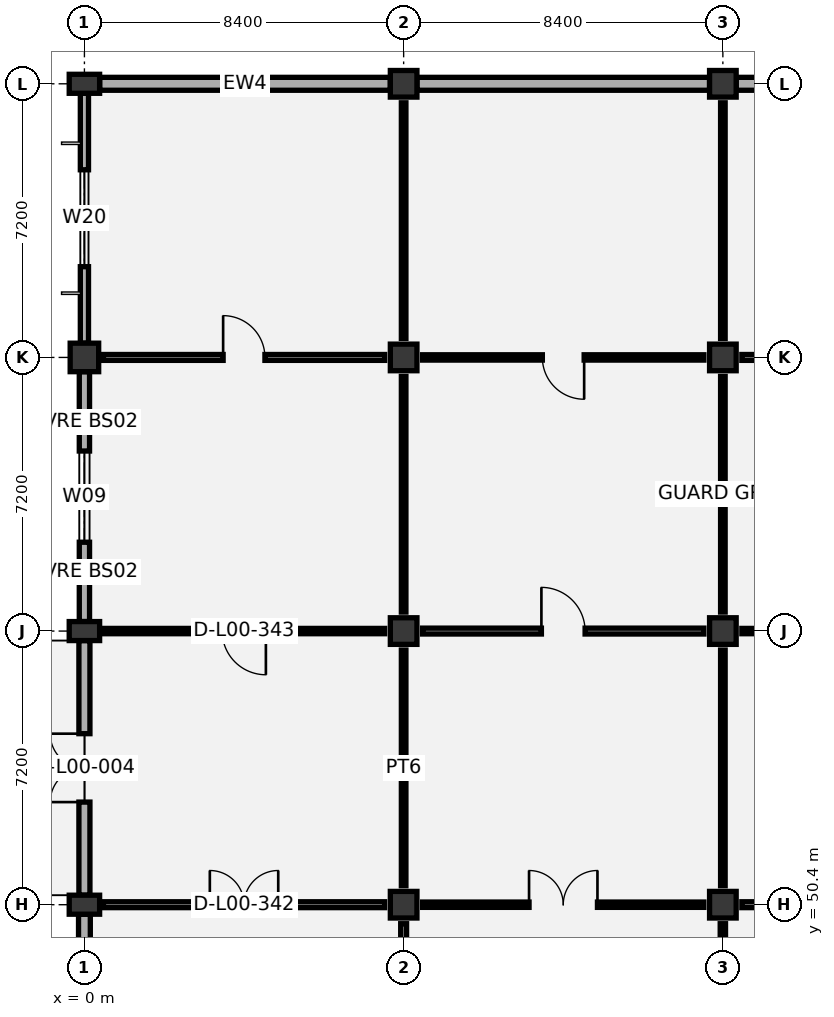
"""IFC4 building model, lengths in metres.
Left out: names, types, materials, properties, quantities, classifications, styles, units other than length and angle.
Written with IfcOpenShell. Run it as: python <this file> out.ifc"""

import sys

from ifc_helpers import new_model, si_unit, direction, frame, frame_2d, origin, origin_2d, place, context, subcontext, project, spatial, rectangle, circle, extrude, element, fill, save


model = new_model("IFC4")
c1 = context("Model", 3, precision=1e-05, world=origin(), true_north=direction((0.0, 1.0)))
c2 = subcontext(c1, "Body", "Model", "MODEL_VIEW")
j1 = project(units=[si_unit("LENGTHUNIT", "METRE"), si_unit("PLANEANGLEUNIT", "RADIAN")], contexts=[c1])
p1 = place(None, origin())
s1 = spatial("IfcSite", under=j1, at=p1, CompositionType="ELEMENT")
p2 = place(p1, origin())
s2 = spatial("IfcBuilding", under=s1, at=p2, CompositionType="ELEMENT")
p3 = place(p2, origin())
s3 = spatial("IfcBuildingStorey", under=s2, at=p3, CompositionType="ELEMENT", Elevation=0.0)
for number, where, z_axis, x_axis in (
    (1, (0.0, 50.4, 0.0), (0.0, 0.0, 1.0), (0.0, 1.0, 0.0)),
    (2, (0.0, 57.6, 0.0), (0.0, 0.0, 1.0), (0.0, 1.0, 0.0)),
):
    element("IfcColumn", number, at=place(p3, frame(where, z_axis=z_axis, x_axis=x_axis)), inside=s3, PredefinedType="COLUMN", context=c2, shape_type="SweptSolid", body=[
        extrude(rectangle(XDim=0.5, YDim=0.8, at=origin_2d()), origin(), (0.0, 0.0, 1.0), 6.0),
    ])
p4 = place(p3, frame((0.0, 64.8, 0.0), z_axis=(0.0, 0.0, 1.0), x_axis=(1.0, 0.0, 0.0)))
e3 = element("IfcColumn", 3, at=p4, inside=s3, PredefinedType="COLUMN", context=c2, shape_type="SweptSolid", body=[
    extrude(circle(Radius=0.375, at=origin_2d()), origin(), (0.0, 0.0, 1.0), 6.0),
])
p5 = place(p3, frame((0.0, 72.0, 0.0), z_axis=(0.0, 0.0, 1.0), x_axis=(0.0, 1.0, 0.0)))
e4 = element("IfcColumn", 4, at=p5, inside=s3, PredefinedType="COLUMN", context=c2, shape_type="SweptSolid", body=[
    extrude(rectangle(XDim=0.5, YDim=0.8, at=origin_2d()), origin(), (0.0, 0.0, 1.0), 6.0),
])
for number, where, z_axis, x_axis in (
    (5, (8.4, 50.4, 0.0), (0.0, 0.0, 1.0), (1.0, 0.0, 0.0)),
    (6, (8.4, 57.6, 0.0), (0.0, 0.0, 1.0), (1.0, 0.0, 0.0)),
    (7, (8.4, 64.8, 0.0), (0.0, 0.0, 1.0), (1.0, 0.0, 0.0)),
    (8, (8.4, 72.0, 0.0), (0.0, 0.0, 1.0), (1.0, 0.0, 0.0)),
    (9, (16.8, 50.4, 0.0), (0.0, 0.0, 1.0), (1.0, 0.0, 0.0)),
    (10, (16.8, 57.6, 0.0), (0.0, 0.0, 1.0), (1.0, 0.0, 0.0)),
    (11, (16.8, 64.8, 0.0), (0.0, 0.0, 1.0), (1.0, 0.0, 0.0)),
    (12, (16.8, 72.0, 0.0), (0.0, 0.0, 1.0), (1.0, 0.0, 0.0)),
):
    element("IfcColumn", number, at=place(p3, frame(where, z_axis=z_axis, x_axis=x_axis)), inside=s3, PredefinedType="COLUMN", context=c2, shape_type="SweptSolid", body=[
        extrude(rectangle(XDim=0.7, YDim=0.7, at=origin_2d()), origin(), (0.0, 0.0, 1.0), 6.0),
    ])
p6 = place(p3, frame((0.0, 43.45, 0.0), z_axis=(0.0, 0.0, 1.0), x_axis=(0.0, 1.0, 0.0)))
e13 = element("IfcWall", 13, at=p6, inside=s3, PredefinedType="SOLIDWALL", context=c2, shape_type="SweptSolid", body=[
    extrude(rectangle(XDim=6.7, YDim=0.31, at=frame_2d((3.35, 0.0))), origin(), (0.0, 0.0, 1.0), 5.02),
])
p7 = place(p6, frame((1.85, 0.0, 0.9)))
e14 = element("IfcOpeningElement", 14, at=p7, cuts=e13, PredefinedType="OPENING", context=c2, shape_type="SweptSolid", body=[
    extrude(rectangle(XDim=3.0, YDim=2.1, at=frame_2d((1.5, 1.05))), frame((0.0, 0.165, 0.0), z_axis=(0.0, -1.0, 0.0), x_axis=(1.0, 0.0, 0.0)), (0.0, 0.0, 1.0), 0.33),
])
p8 = place(p3, frame((0.0, 50.65, 0.0), z_axis=(0.0, 0.0, 1.0), x_axis=(0.0, 1.0, 0.0)))
e15 = element("IfcWall", 15, at=p8, inside=s3, PredefinedType="SOLIDWALL", context=c2, shape_type="SweptSolid", body=[
    extrude(rectangle(XDim=6.7, YDim=0.29, at=frame_2d((3.35, 0.0))), origin(), (0.0, 0.0, 1.0), 5.02),
])
p9 = place(p8, frame((2.45, 0.0, 0.0)))
e16 = element("IfcOpeningElement", 16, at=p9, cuts=e15, PredefinedType="OPENING", context=c2, shape_type="SweptSolid", body=[
    extrude(rectangle(XDim=1.8, YDim=2.35, at=frame_2d((0.9, 1.175))), frame((0.0, 0.155, 0.0), z_axis=(0.0, -1.0, 0.0), x_axis=(1.0, 0.0, 0.0)), (0.0, 0.0, 1.0), 0.31),
])
p10 = place(p3, frame((0.0, 57.85, 0.0), z_axis=(0.0, 0.0, 1.0), x_axis=(0.0, 1.0, 0.0)))
e17 = element("IfcWall", 17, at=p10, inside=s3, PredefinedType="SOLIDWALL", context=c2, shape_type="SweptSolid", body=[
    extrude(rectangle(XDim=6.575, YDim=0.27, at=frame_2d((3.288, 0.0))), origin(), (0.0, 0.0, 1.0), 5.02),
])
p11 = place(p10, frame((2.087, 0.0, 0.9)))
e18 = element("IfcOpeningElement", 18, at=p11, cuts=e17, PredefinedType="OPENING", context=c2, shape_type="SweptSolid", body=[
    extrude(rectangle(XDim=2.4, YDim=2.1, at=frame_2d((1.2, 1.05))), frame((0.0, 0.145, 0.0), z_axis=(0.0, -1.0, 0.0), x_axis=(1.0, 0.0, 0.0)), (0.0, 0.0, 1.0), 0.29),
])
p12 = place(p3, frame((0.4, 72.0, 0.0), z_axis=(0.0, 0.0, 1.0), x_axis=(1.0, 0.0, 0.0)))
e19 = element("IfcWall", 19, at=p12, inside=s3, PredefinedType="SOLIDWALL", context=c2, shape_type="SweptSolid", body=[
    extrude(rectangle(XDim=7.65, YDim=0.34, at=frame_2d((3.825, 0.0))), origin(), (0.0, 0.0, 1.0), 5.02),
])
p13 = place(p3, frame((0.0, 65.175, 0.0), z_axis=(0.0, 0.0, 1.0), x_axis=(0.0, 1.0, 0.0)))
e20 = element("IfcWall", 20, at=p13, inside=s3, PredefinedType="SOLIDWALL", context=c2, shape_type="SweptSolid", body=[
    extrude(rectangle(XDim=6.575, YDim=0.215, at=frame_2d((3.288, 0.0))), origin(), (0.0, 0.0, 1.0), 5.02),
])
p14 = place(p13, frame((2.012, 0.0, 0.9)))
e21 = element("IfcOpeningElement", 21, at=p14, cuts=e20, PredefinedType="OPENING", context=c2, shape_type="SweptSolid", body=[
    extrude(rectangle(XDim=2.55, YDim=1.95, at=frame_2d((1.275, 0.975))), frame((0.0, 0.117, 0.0), z_axis=(0.0, -1.0, 0.0), x_axis=(1.0, 0.0, 0.0)), (0.0, 0.0, 1.0), 0.235),
])
p15 = place(p3, frame((8.75, 72.0, 0.0), z_axis=(0.0, 0.0, 1.0), x_axis=(1.0, 0.0, 0.0)))
e22 = element("IfcWall", 22, at=p15, inside=s3, PredefinedType="SOLIDWALL", context=c2, shape_type="SweptSolid", body=[
    extrude(rectangle(XDim=7.7, YDim=0.34, at=frame_2d((3.85, 0.0))), origin(), (0.0, 0.0, 1.0), 5.02),
])
p16 = place(p3, frame((17.15, 72.0, 0.0), z_axis=(0.0, 0.0, 1.0), x_axis=(1.0, 0.0, 0.0)))
e23 = element("IfcWall", 23, at=p16, inside=s3, PredefinedType="SOLIDWALL", context=c2, shape_type="SweptSolid", body=[
    extrude(rectangle(XDim=7.7, YDim=0.34, at=frame_2d((3.85, 0.0))), origin(), (0.0, 0.0, 1.0), 5.02),
])
p17 = place(p3, frame((8.4, 43.7, 0.0), z_axis=(0.0, 0.0, 1.0), x_axis=(0.0, 1.0, 0.0)))
e24 = element("IfcWall", 24, at=p17, inside=s3, PredefinedType="PARTITIONING", context=c2, shape_type="SweptSolid", body=[
    extrude(rectangle(XDim=6.2, YDim=0.155, at=frame_2d((3.1, 0.0))), origin(), (0.0, 0.0, 1.0), 4.92),
])
p18 = place(p17, frame((2.3, 0.0, 0.0)))
e25 = element("IfcOpeningElement", 25, at=p18, cuts=e24, PredefinedType="OPENING", context=c2, shape_type="SweptSolid", body=[
    extrude(rectangle(XDim=1.6, YDim=2.2, at=frame_2d((0.8, 1.1))), frame((0.0, 0.087, 0.0), z_axis=(0.0, -1.0, 0.0), x_axis=(1.0, 0.0, 0.0)), (0.0, 0.0, 1.0), 0.175),
])
p19 = place(p3, frame((0.5, 50.4, 0.0), z_axis=(0.0, 0.0, 1.0), x_axis=(1.0, 0.0, 0.0)))
e26 = element("IfcWall", 26, at=p19, inside=s3, PredefinedType="PARTITIONING", context=c2, shape_type="SweptSolid", body=[
    extrude(rectangle(XDim=7.4, YDim=0.155, at=frame_2d((3.7, 0.0))), origin(), (0.0, 0.0, 1.0), 4.87),
])
p20 = place(p19, frame((2.8, 0.0, 0.0)))
e27 = element("IfcOpeningElement", 27, at=p20, cuts=e26, PredefinedType="OPENING", context=c2, shape_type="SweptSolid", body=[
    extrude(rectangle(XDim=1.8, YDim=2.25, at=frame_2d((0.9, 1.125))), frame((0.0, 0.087, 0.0), z_axis=(0.0, -1.0, 0.0), x_axis=(1.0, 0.0, 0.0)), (0.0, 0.0, 1.0), 0.175),
])
p21 = place(p3, frame((8.4, 50.9, 0.0), z_axis=(0.0, 0.0, 1.0), x_axis=(0.0, 1.0, 0.0)))
e28 = element("IfcWall", 28, at=p21, inside=s3, PredefinedType="PARTITIONING", context=c2, shape_type="SweptSolid", body=[
    extrude(rectangle(XDim=6.2, YDim=0.12, at=frame_2d((3.1, 0.0))), origin(), (0.0, 0.0, 1.0), 5.38),
])
p22 = place(p3, frame((0.5, 57.6, 0.0), z_axis=(0.0, 0.0, 1.0), x_axis=(1.0, 0.0, 0.0)))
e29 = element("IfcWall", 29, at=p22, inside=s3, PredefinedType="PARTITIONING", context=c2, shape_type="SweptSolid", body=[
    extrude(rectangle(XDim=7.4, YDim=0.14, at=frame_2d((3.7, 0.0))), origin(), (0.0, 0.0, 1.0), 4.87),
])
p23 = place(p22, frame((3.125, 0.0, 0.0)))
e30 = element("IfcOpeningElement", 30, at=p23, cuts=e29, PredefinedType="OPENING", context=c2, shape_type="SweptSolid", body=[
    extrude(rectangle(XDim=1.15, YDim=2.1, at=frame_2d((0.575, 1.05))), frame((0.0, 0.08, 0.0), z_axis=(0.0, -1.0, 0.0), x_axis=(1.0, 0.0, 0.0)), (0.0, 0.0, 1.0), 0.16),
])
p24 = place(p3, frame((8.4, 58.1, 0.0), z_axis=(0.0, 0.0, 1.0), x_axis=(0.0, 1.0, 0.0)))
e31 = element("IfcWall", 31, at=p24, inside=s3, PredefinedType="PARTITIONING", context=c2, shape_type="SweptSolid", body=[
    extrude(rectangle(XDim=6.2, YDim=0.12, at=frame_2d((3.1, 0.0))), origin(), (0.0, 0.0, 1.0), 4.92),
])
p25 = place(p3, frame((0.5, 64.8, 0.0), z_axis=(0.0, 0.0, 1.0), x_axis=(1.0, 0.0, 0.0)))
e32 = element("IfcWall", 32, at=p25, inside=s3, PredefinedType="PARTITIONING", context=c2, shape_type="SweptSolid", body=[
    extrude(rectangle(XDim=7.4, YDim=0.155, at=frame_2d((3.7, 0.0))), origin(), (0.0, 0.0, 1.0), 4.87),
])
p26 = place(p25, frame((3.15, 0.0, 0.0)))
e33 = element("IfcOpeningElement", 33, at=p26, cuts=e32, PredefinedType="OPENING", context=c2, shape_type="SweptSolid", body=[
    extrude(rectangle(XDim=1.1, YDim=2.1, at=frame_2d((0.55, 1.05))), frame((0.0, 0.087, 0.0), z_axis=(0.0, -1.0, 0.0), x_axis=(1.0, 0.0, 0.0)), (0.0, 0.0, 1.0), 0.175),
])
p27 = place(p3, frame((8.4, 65.3, 0.0), z_axis=(0.0, 0.0, 1.0), x_axis=(0.0, 1.0, 0.0)))
e34 = element("IfcWall", 34, at=p27, inside=s3, PredefinedType="PARTITIONING", context=c2, shape_type="SweptSolid", body=[
    extrude(rectangle(XDim=6.2, YDim=0.12, at=frame_2d((3.1, 0.0))), origin(), (0.0, 0.0, 1.0), 5.17),
])
p28 = place(p3, frame((16.8, 43.7, 0.0), z_axis=(0.0, 0.0, 1.0), x_axis=(0.0, 1.0, 0.0)))
e35 = element("IfcWall", 35, at=p28, inside=s3, PredefinedType="PARTITIONING", context=c2, shape_type="SweptSolid", body=[
    extrude(rectangle(XDim=6.2, YDim=0.14, at=frame_2d((3.1, 0.0))), origin(), (0.0, 0.0, 1.0), 5.38),
])
p29 = place(p28, frame((2.3, 0.0, 0.0)))
e36 = element("IfcOpeningElement", 36, at=p29, cuts=e35, PredefinedType="OPENING", context=c2, shape_type="SweptSolid", body=[
    extrude(rectangle(XDim=1.6, YDim=2.2, at=frame_2d((0.8, 1.1))), frame((0.0, 0.08, 0.0), z_axis=(0.0, -1.0, 0.0), x_axis=(1.0, 0.0, 0.0)), (0.0, 0.0, 1.0), 0.16),
])
p30 = place(p3, frame((8.9, 50.4, 0.0), z_axis=(0.0, 0.0, 1.0), x_axis=(1.0, 0.0, 0.0)))
e37 = element("IfcWall", 37, at=p30, inside=s3, PredefinedType="PARTITIONING", context=c2, shape_type="SweptSolid", body=[
    extrude(rectangle(XDim=7.4, YDim=0.14, at=frame_2d((3.7, 0.0))), origin(), (0.0, 0.0, 1.0), 4.87),
])
p31 = place(p30, frame((2.8, 0.0, 0.0)))
e38 = element("IfcOpeningElement", 38, at=p31, cuts=e37, PredefinedType="OPENING", context=c2, shape_type="SweptSolid", body=[
    extrude(rectangle(XDim=1.8, YDim=2.25, at=frame_2d((0.9, 1.125))), frame((0.0, 0.08, 0.0), z_axis=(0.0, -1.0, 0.0), x_axis=(1.0, 0.0, 0.0)), (0.0, 0.0, 1.0), 0.16),
])
p32 = place(p3, frame((16.8, 50.9, 0.0), z_axis=(0.0, 0.0, 1.0), x_axis=(0.0, 1.0, 0.0)))
e39 = element("IfcWall", 39, at=p32, inside=s3, PredefinedType="PARTITIONING", context=c2, shape_type="SweptSolid", body=[
    extrude(rectangle(XDim=6.2, YDim=0.12, at=frame_2d((3.1, 0.0))), origin(), (0.0, 0.0, 1.0), 4.92),
])
p33 = place(p3, frame((8.9, 57.6, 0.0), z_axis=(0.0, 0.0, 1.0), x_axis=(1.0, 0.0, 0.0)))
e40 = element("IfcWall", 40, at=p33, inside=s3, PredefinedType="PARTITIONING", context=c2, shape_type="SweptSolid", body=[
    extrude(rectangle(XDim=7.4, YDim=0.155, at=frame_2d((3.7, 0.0))), origin(), (0.0, 0.0, 1.0), 4.87),
])
p34 = place(p33, frame((3.125, 0.0, 0.0)))
e41 = element("IfcOpeningElement", 41, at=p34, cuts=e40, PredefinedType="OPENING", context=c2, shape_type="SweptSolid", body=[
    extrude(rectangle(XDim=1.15, YDim=2.1, at=frame_2d((0.575, 1.05))), frame((0.0, 0.087, 0.0), z_axis=(0.0, -1.0, 0.0), x_axis=(1.0, 0.0, 0.0)), (0.0, 0.0, 1.0), 0.175),
])
p35 = place(p3, frame((16.8, 58.1, 0.0), z_axis=(0.0, 0.0, 1.0), x_axis=(0.0, 1.0, 0.0)))
e42 = element("IfcWall", 42, at=p35, inside=s3, PredefinedType="PARTITIONING", context=c2, shape_type="SweptSolid", body=[
    extrude(rectangle(XDim=6.2, YDim=0.12, at=frame_2d((3.1, 0.0))), origin(), (0.0, 0.0, 1.0), 5.17),
])
p36 = place(p3, frame((8.9, 64.8, 0.0), z_axis=(0.0, 0.0, 1.0), x_axis=(1.0, 0.0, 0.0)))
e43 = element("IfcWall", 43, at=p36, inside=s3, PredefinedType="PARTITIONING", context=c2, shape_type="SweptSolid", body=[
    extrude(rectangle(XDim=7.4, YDim=0.14, at=frame_2d((3.7, 0.0))), origin(), (0.0, 0.0, 1.0), 4.87),
])
p37 = place(p36, frame((3.15, 0.0, 0.0)))
e44 = element("IfcOpeningElement", 44, at=p37, cuts=e43, PredefinedType="OPENING", context=c2, shape_type="SweptSolid", body=[
    extrude(rectangle(XDim=1.1, YDim=2.1, at=frame_2d((0.55, 1.05))), frame((0.0, 0.08, 0.0), z_axis=(0.0, -1.0, 0.0), x_axis=(1.0, 0.0, 0.0)), (0.0, 0.0, 1.0), 0.16),
])
p38 = place(p3, frame((16.8, 65.3, 0.0), z_axis=(0.0, 0.0, 1.0), x_axis=(0.0, 1.0, 0.0)))
e45 = element("IfcWall", 45, at=p38, inside=s3, PredefinedType="PARTITIONING", context=c2, shape_type="SweptSolid", body=[
    extrude(rectangle(XDim=6.2, YDim=0.12, at=frame_2d((3.1, 0.0))), origin(), (0.0, 0.0, 1.0), 4.92),
])
p39 = place(p3, frame((17.3, 50.4, 0.0), z_axis=(0.0, 0.0, 1.0), x_axis=(1.0, 0.0, 0.0)))
e46 = element("IfcWall", 46, at=p39, inside=s3, PredefinedType="PARTITIONING", context=c2, shape_type="SweptSolid", body=[
    extrude(rectangle(XDim=7.4, YDim=0.155, at=frame_2d((3.7, 0.0))), origin(), (0.0, 0.0, 1.0), 4.87),
])
p40 = place(p39, frame((2.9, 0.0, 0.0)))
e47 = element("IfcOpeningElement", 47, at=p40, cuts=e46, PredefinedType="OPENING", context=c2, shape_type="SweptSolid", body=[
    extrude(rectangle(XDim=1.6, YDim=2.2, at=frame_2d((0.8, 1.1))), frame((0.0, 0.087, 0.0), z_axis=(0.0, -1.0, 0.0), x_axis=(1.0, 0.0, 0.0)), (0.0, 0.0, 1.0), 0.175),
])
p41 = place(p3, frame((17.3, 57.6, 0.0), z_axis=(0.0, 0.0, 1.0), x_axis=(1.0, 0.0, 0.0)))
e48 = element("IfcWall", 48, at=p41, inside=s3, PredefinedType="PARTITIONING", context=c2, shape_type="SweptSolid", body=[
    extrude(rectangle(XDim=7.4, YDim=0.14, at=frame_2d((3.7, 0.0))), origin(), (0.0, 0.0, 1.0), 4.87),
])
p42 = place(p41, frame((3.15, 0.0, 0.0)))
e49 = element("IfcOpeningElement", 49, at=p42, cuts=e48, PredefinedType="OPENING", context=c2, shape_type="SweptSolid", body=[
    extrude(rectangle(XDim=1.1, YDim=2.1, at=frame_2d((0.55, 1.05))), frame((0.0, 0.08, 0.0), z_axis=(0.0, -1.0, 0.0), x_axis=(1.0, 0.0, 0.0)), (0.0, 0.0, 1.0), 0.16),
])
p43 = place(p3, frame((17.3, 64.8, 0.0), z_axis=(0.0, 0.0, 1.0), x_axis=(1.0, 0.0, 0.0)))
e50 = element("IfcWall", 50, at=p43, inside=s3, PredefinedType="PARTITIONING", context=c2, shape_type="SweptSolid", body=[
    extrude(rectangle(XDim=7.4, YDim=0.155, at=frame_2d((3.7, 0.0))), origin(), (0.0, 0.0, 1.0), 4.87),
])
p44 = place(p43, frame((3.125, 0.0, 0.0)))
e51 = element("IfcOpeningElement", 51, at=p44, cuts=e50, PredefinedType="OPENING", context=c2, shape_type="SweptSolid", body=[
    extrude(rectangle(XDim=1.15, YDim=2.1, at=frame_2d((0.575, 1.05))), frame((0.0, 0.087, 0.0), z_axis=(0.0, -1.0, 0.0), x_axis=(1.0, 0.0, 0.0)), (0.0, 0.0, 1.0), 0.175),
])
p45 = place(p9, origin())
e52 = element("IfcDoor", 52, at=p45, inside=s3, OperationType="DOUBLE_DOOR_SINGLE_SWING", PredefinedType="DOOR", context=c2, shape_type="SweptSolid", body=[
    extrude(rectangle(XDim=1.8, YDim=2.35, at=frame_2d((0.9, 1.175))), frame((0.0, 0.025, 0.0), z_axis=(0.0, -1.0, 0.0), x_axis=(1.0, 0.0, 0.0)), (0.0, 0.0, 1.0), 0.05),
])
fill(e16, e52)
p46 = place(p11, origin())
e53 = element("IfcWindow", 53, at=p46, inside=s3, PartitioningType="SINGLE_PANEL", PredefinedType="WINDOW", context=c2, shape_type="SweptSolid", body=[
    extrude(rectangle(XDim=2.4, YDim=2.1, at=frame_2d((1.2, 1.05))), frame((0.0, 0.03, 0.0), z_axis=(0.0, -1.0, 0.0), x_axis=(1.0, 0.0, 0.0)), (0.0, 0.0, 1.0), 0.06),
])
fill(e18, e53)
p47 = place(p14, origin())
e54 = element("IfcWindow", 54, at=p47, inside=s3, PartitioningType="SINGLE_PANEL", PredefinedType="WINDOW", context=c2, shape_type="SweptSolid", body=[
    extrude(rectangle(XDim=2.55, YDim=1.95, at=frame_2d((1.275, 0.975))), frame((0.0, 0.03, 0.0), z_axis=(0.0, -1.0, 0.0), x_axis=(1.0, 0.0, 0.0)), (0.0, 0.0, 1.0), 0.06),
])
fill(e21, e54)
p48 = place(p20, origin())
e55 = element("IfcDoor", 55, at=p48, inside=s3, OperationType="DOUBLE_DOOR_SINGLE_SWING", PredefinedType="DOOR", context=c2, shape_type="SweptSolid", body=[
    extrude(rectangle(XDim=1.8, YDim=2.25, at=frame_2d((0.9, 1.125))), frame((0.0, 0.025, 0.0), z_axis=(0.0, -1.0, 0.0), x_axis=(1.0, 0.0, 0.0)), (0.0, 0.0, 1.0), 0.05),
])
fill(e27, e55)
p49 = place(p23, frame((1.15, 0.0, 0.0), z_axis=(0.0, 0.0, 1.0), x_axis=(-1.0, 0.0, 0.0)))
e56 = element("IfcDoor", 56, at=p49, inside=s3, OperationType="SINGLE_SWING_LEFT", PredefinedType="DOOR", context=c2, shape_type="SweptSolid", body=[
    extrude(rectangle(XDim=1.15, YDim=2.1, at=frame_2d((0.575, 1.05))), frame((0.0, 0.025, 0.0), z_axis=(0.0, -1.0, 0.0), x_axis=(1.0, 0.0, 0.0)), (0.0, 0.0, 1.0), 0.05),
])
fill(e30, e56)
p50 = place(p26, origin())
e57 = element("IfcDoor", 57, at=p50, inside=s3, OperationType="SINGLE_SWING_LEFT", PredefinedType="DOOR", context=c2, shape_type="SweptSolid", body=[
    extrude(rectangle(XDim=1.1, YDim=2.1, at=frame_2d((0.55, 1.05))), frame((0.0, 0.025, 0.0), z_axis=(0.0, -1.0, 0.0), x_axis=(1.0, 0.0, 0.0)), (0.0, 0.0, 1.0), 0.05),
])
fill(e33, e57)
p51 = place(p31, origin())
e58 = element("IfcDoor", 58, at=p51, inside=s3, OperationType="DOUBLE_DOOR_SINGLE_SWING", PredefinedType="DOOR", context=c2, shape_type="SweptSolid", body=[
    extrude(rectangle(XDim=1.8, YDim=2.25, at=frame_2d((0.9, 1.125))), frame((0.0, 0.025, 0.0), z_axis=(0.0, -1.0, 0.0), x_axis=(1.0, 0.0, 0.0)), (0.0, 0.0, 1.0), 0.05),
])
fill(e38, e58)
p52 = place(p34, origin())
e59 = element("IfcDoor", 59, at=p52, inside=s3, OperationType="SINGLE_SWING_LEFT", PredefinedType="DOOR", context=c2, shape_type="SweptSolid", body=[
    extrude(rectangle(XDim=1.15, YDim=2.1, at=frame_2d((0.575, 1.05))), frame((0.0, 0.025, 0.0), z_axis=(0.0, -1.0, 0.0), x_axis=(1.0, 0.0, 0.0)), (0.0, 0.0, 1.0), 0.05),
])
fill(e41, e59)
p53 = place(p37, frame((1.1, 0.0, 0.0), z_axis=(0.0, 0.0, 1.0), x_axis=(-1.0, 0.0, 0.0)))
e60 = element("IfcDoor", 60, at=p53, inside=s3, OperationType="SINGLE_SWING_LEFT", PredefinedType="DOOR", context=c2, shape_type="SweptSolid", body=[
    extrude(rectangle(XDim=1.1, YDim=2.1, at=frame_2d((0.55, 1.05))), frame((0.0, 0.025, 0.0), z_axis=(0.0, -1.0, 0.0), x_axis=(1.0, 0.0, 0.0)), (0.0, 0.0, 1.0), 0.05),
])
fill(e44, e60)
save(model, sys.argv[1])
